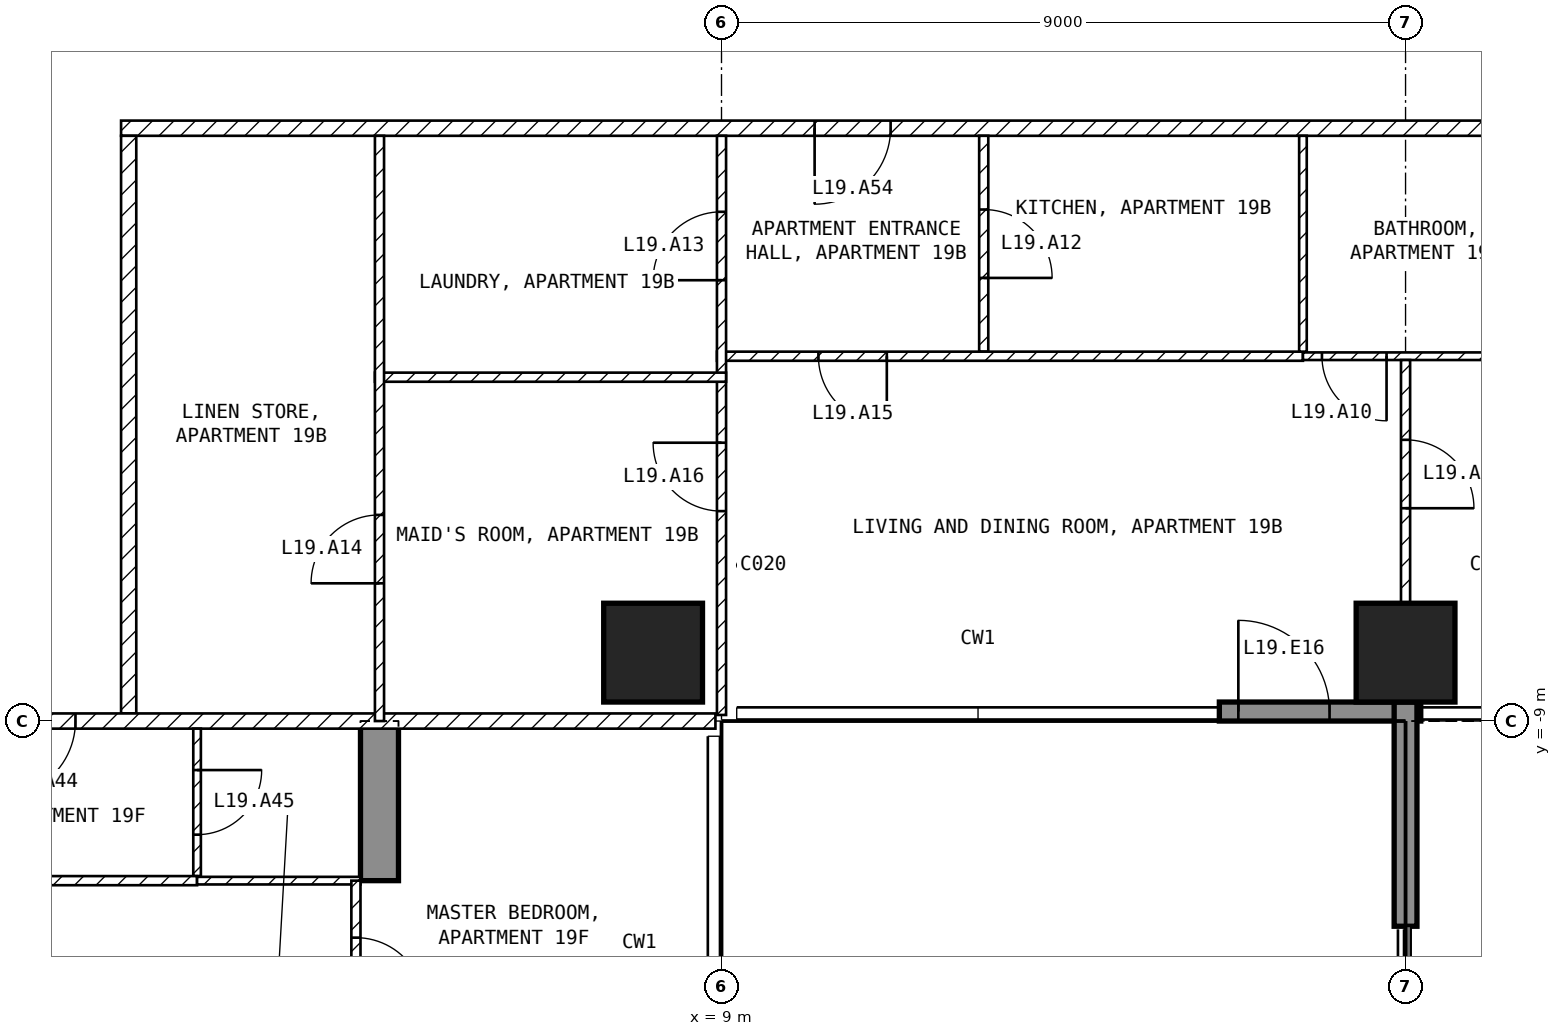
"""IFC4 building model, lengths in metres.
Left out: names, types, materials, properties, quantities, classifications, styles, units other than length and angle.
Written with IfcOpenShell. Run it as: python <this file> out.ifc"""

import sys

from ifc_helpers import new_model, si_unit, direction, frame, frame_2d, origin, origin_2d, place, context, subcontext, project, spatial, polyline, rectangle, outline, extrude, element, fill, save


model = new_model("IFC4")
c1 = context("Model", 3, precision=1e-05, world=origin(), true_north=direction((0.0, 1.0)))
c2 = subcontext(c1, "Body", "Model", "MODEL_VIEW")
j1 = project(units=[si_unit("LENGTHUNIT", "METRE"), si_unit("PLANEANGLEUNIT", "RADIAN")], contexts=[c1])
p1 = place(None, origin())
s1 = spatial("IfcSite", under=j1, at=p1, CompositionType="ELEMENT")
p2 = place(p1, origin())
s2 = spatial("IfcBuilding", under=s1, at=p2, CompositionType="ELEMENT")
p3 = place(p2, frame((0.0, 0.0, 85.5)))
s3 = spatial("IfcBuildingStorey", under=s2, at=p3, CompositionType="ELEMENT", Elevation=85.5)
for number, where, z_axis, x_axis in (
    (1, (8.1, -8.1, -0.25), (0.0, 0.0, 1.0), (1.0, 0.0, 0.0)),
    (2, (18.0, -8.1, -0.25), (0.0, 0.0, 1.0), (1.0, 0.0, 0.0)),
):
    element("IfcColumn", number, at=place(p3, frame(where, z_axis=z_axis, x_axis=x_axis)), inside=s3, PredefinedType="COLUMN", context=c2, shape_type="SweptSolid", body=[
        extrude(rectangle(XDim=1.3, YDim=1.3, at=origin_2d()), origin(), (0.0, 0.0, 1.0), 3.5),
    ])
p4 = place(p3, frame((4.25, -25.45, -0.25), z_axis=(1.0, 0.0, 0.0), x_axis=(0.0, 1.0, 0.0)))
e3 = element("IfcWall", 3, at=p4, inside=s3, PredefinedType="SHEAR", context=c2, shape_type="SweptSolid", body=[
    extrude(outline(polyline([(0.0, 0.0), (4.15, 0.0), (4.15, 2.65), (6.55, 2.65), (6.55, 0.0), (11.95, 0.0), (11.95, 2.65), (14.35, 2.65), (14.35, 0.0), (16.45, 0.0), (16.45, 3.5), (0.0, 3.5), (0.0, 0.0)])), origin(), (0.0, 0.0, 1.0), 0.5),
])
p5 = place(p3, frame((15.55, -8.875, 0.0), z_axis=(0.0, 0.0, 1.0), x_axis=(1.0, 0.0, 0.0)))
e4 = element("IfcWall", 4, at=p5, inside=s3, PredefinedType="SOLIDWALL", context=c2, shape_type="SweptSolid", body=[
    extrude(rectangle(XDim=2.65, YDim=0.25, at=frame_2d((1.325, 0.0))), origin(), (0.0, 0.0, 1.0), 3.25),
])
p6 = place(p5, frame((0.25, 0.0, 0.0)))
e5 = element("IfcOpeningElement", 5, at=p6, cuts=e4, PredefinedType="OPENING", context=c2, shape_type="SweptSolid", body=[
    extrude(rectangle(XDim=1.2, YDim=2.4, at=frame_2d((0.6, 1.2))), frame((0.0, 0.135, 0.0), z_axis=(0.0, -1.0, 0.0), x_axis=(1.0, 0.0, 0.0)), (0.0, 0.0, 1.0), 0.27),
])
p7 = place(p3, frame((18.0, -8.75, 0.0), z_axis=(0.0, 0.0, 1.0), x_axis=(0.0, -1.0, 0.0)))
e6 = element("IfcWall", 6, at=p7, inside=s3, PredefinedType="SOLIDWALL", context=c2, shape_type="SweptSolid", body=[
    extrude(rectangle(XDim=2.95, YDim=0.3, at=frame_2d((1.475, 0.0))), origin(), (0.0, 0.0, 1.0), 3.25),
])
p8 = place(p3, frame((21.6, -1.2, 0.0), z_axis=(0.0, 0.0, 1.0), x_axis=(-1.0, 0.0, 0.0)))
e7 = element("IfcWall", 7, at=p8, inside=s3, PredefinedType="PARTITIONING", context=c2, shape_type="SweptSolid", body=[
    extrude(rectangle(XDim=20.5, YDim=0.2, at=frame_2d((10.25, 0.0))), origin(), (0.0, 0.0, 1.0), 3.25),
])
p9 = place(p8, frame((10.375, 0.0, 0.0)))
e8 = element("IfcOpeningElement", 8, at=p9, cuts=e7, PredefinedType="OPENING", context=c2, shape_type="SweptSolid", body=[
    extrude(rectangle(XDim=1.0, YDim=2.1, at=frame_2d((0.5, 1.05))), frame((0.0, 0.11, 0.0), z_axis=(0.0, -1.0, 0.0), x_axis=(1.0, 0.0, 0.0)), (0.0, 0.0, 1.0), 0.22),
])
p10 = place(p3, frame((1.2, -1.3, 0.0), z_axis=(0.0, 0.0, 1.0), x_axis=(0.0, -1.0, 0.0)))
e9 = element("IfcWall", 9, at=p10, inside=s3, PredefinedType="PARTITIONING", context=c2, shape_type="SweptSolid", body=[
    extrude(rectangle(XDim=7.6, YDim=0.2, at=frame_2d((3.8, 0.0))), origin(), (0.0, 0.0, 1.0), 3.25),
])
p11 = place(p3, frame((8.92, -9.0, 0.0), z_axis=(0.0, 0.0, 1.0), x_axis=(-1.0, 0.0, 0.0)))
e10 = element("IfcWall", 10, at=p11, inside=s3, PredefinedType="PARTITIONING", context=c2, shape_type="SweptSolid", body=[
    extrude(rectangle(XDim=17.84, YDim=0.2, at=frame_2d((8.92, 0.0))), origin(), (0.0, 0.0, 1.0), 3.25),
])
p12 = place(p11, frame((8.42, 0.0, 0.0)))
e11 = element("IfcOpeningElement", 11, at=p12, cuts=e10, PredefinedType="OPENING", context=c2, shape_type="SweptSolid", body=[
    extrude(rectangle(XDim=1.0, YDim=2.1, at=frame_2d((0.5, 1.05))), frame((0.0, 0.11, 0.0), z_axis=(0.0, -1.0, 0.0), x_axis=(1.0, 0.0, 0.0)), (0.0, 0.0, 1.0), 0.22),
])
p13 = place(p3, frame((12.45, -1.3, 0.0), z_axis=(0.0, 0.0, 1.0), x_axis=(0.0, -1.0, 0.0)))
e12 = element("IfcWall", 12, at=p13, inside=s3, PredefinedType="PARTITIONING", context=c2, shape_type="SweptSolid", body=[
    extrude(rectangle(XDim=2.84, YDim=0.12, at=frame_2d((1.42, 0.0))), origin(), (0.0, 0.0, 1.0), 3.25),
])
p14 = place(p13, frame((0.97, 0.0, 0.0)))
e13 = element("IfcOpeningElement", 13, at=p14, cuts=e12, PredefinedType="OPENING", context=c2, shape_type="SweptSolid", body=[
    extrude(rectangle(XDim=0.9, YDim=2.1, at=frame_2d((0.45, 1.05))), frame((0.0, 0.07, 0.0), z_axis=(0.0, -1.0, 0.0), x_axis=(1.0, 0.0, 0.0)), (0.0, 0.0, 1.0), 0.14),
])
p15 = place(p3, frame((16.65, -4.2, 0.0), z_axis=(0.0, 0.0, 1.0), x_axis=(-1.0, 0.0, 0.0)))
e14 = element("IfcWall", 14, at=p15, inside=s3, PredefinedType="PARTITIONING", context=c2, shape_type="SweptSolid", body=[
    extrude(rectangle(XDim=7.71, YDim=0.12, at=frame_2d((3.855, 0.0))), origin(), (0.0, 0.0, 1.0), 3.25),
])
p16 = place(p15, frame((5.475, 0.0, 0.0)))
e15 = element("IfcOpeningElement", 15, at=p16, cuts=e14, PredefinedType="OPENING", context=c2, shape_type="SweptSolid", body=[
    extrude(rectangle(XDim=0.9, YDim=2.1, at=frame_2d((0.45, 1.05))), frame((0.0, 0.07, 0.0), z_axis=(0.0, -1.0, 0.0), x_axis=(1.0, 0.0, 0.0)), (0.0, 0.0, 1.0), 0.14),
])
p17 = place(p3, frame((9.0, -8.92, 0.0), z_axis=(0.0, 0.0, 1.0), x_axis=(0.0, 1.0, 0.0)))
e16 = element("IfcWall", 16, at=p17, inside=s3, PredefinedType="PARTITIONING", context=c2, shape_type="SweptSolid", body=[
    extrude(rectangle(XDim=7.62, YDim=0.12, at=frame_2d((3.81, 0.0))), origin(), (0.0, 0.0, 1.0), 3.25),
])
p18 = place(p17, frame((5.72, 0.0, 0.0)))
e17 = element("IfcOpeningElement", 17, at=p18, cuts=e16, PredefinedType="OPENING", context=c2, shape_type="SweptSolid", body=[
    extrude(rectangle(XDim=0.9, YDim=2.1, at=frame_2d((0.45, 1.05))), frame((0.0, 0.07, 0.0), z_axis=(0.0, -1.0, 0.0), x_axis=(1.0, 0.0, 0.0)), (0.0, 0.0, 1.0), 0.14),
])
p19 = place(p17, frame((2.682, 0.0, 0.0)))
e18 = element("IfcOpeningElement", 18, at=p19, cuts=e16, PredefinedType="OPENING", context=c2, shape_type="SweptSolid", body=[
    extrude(rectangle(XDim=0.9, YDim=2.1, at=frame_2d((0.45, 1.05))), frame((0.0, 0.07, 0.0), z_axis=(0.0, -1.0, 0.0), x_axis=(1.0, 0.0, 0.0)), (0.0, 0.0, 1.0), 0.14),
])
p20 = place(p3, frame((16.65, -1.3, 0.0), z_axis=(0.0, 0.0, 1.0), x_axis=(0.0, -1.0, 0.0)))
e19 = element("IfcWall", 19, at=p20, inside=s3, PredefinedType="PARTITIONING", context=c2, shape_type="SweptSolid", body=[
    extrude(rectangle(XDim=2.84, YDim=0.1, at=frame_2d((1.42, 0.0))), origin(), (0.0, 0.0, 1.0), 3.25),
])
p21 = place(p3, frame((19.8, -4.2, 0.0), z_axis=(0.0, 0.0, 1.0), x_axis=(-1.0, 0.0, 0.0)))
e20 = element("IfcWall", 20, at=p21, inside=s3, PredefinedType="PARTITIONING", context=c2, shape_type="SweptSolid", body=[
    extrude(rectangle(XDim=3.15, YDim=0.1, at=frame_2d((1.575, 0.0))), origin(), (0.0, 0.0, 1.0), 3.25),
])
p22 = place(p21, frame((2.05, 0.0, 0.0)))
e21 = element("IfcOpeningElement", 21, at=p22, cuts=e20, PredefinedType="OPENING", context=c2, shape_type="SweptSolid", body=[
    extrude(rectangle(XDim=0.85, YDim=2.1, at=frame_2d((0.425, 1.05))), frame((0.0, 0.06, 0.0), z_axis=(0.0, -1.0, 0.0), x_axis=(1.0, 0.0, 0.0)), (0.0, 0.0, 1.0), 0.12),
])
p23 = place(p3, frame((18.0, -4.25, 0.0), z_axis=(0.0, 0.0, 1.0), x_axis=(0.0, -1.0, 0.0)))
e22 = element("IfcWall", 22, at=p23, inside=s3, PredefinedType="PARTITIONING", context=c2, shape_type="SweptSolid", body=[
    extrude(rectangle(XDim=3.2, YDim=0.12, at=frame_2d((1.6, 0.0))), origin(), (0.0, 0.0, 1.0), 2.346),
])
p24 = place(p23, frame((1.05, 0.0, 0.0)))
e23 = element("IfcOpeningElement", 23, at=p24, cuts=e22, PredefinedType="OPENING", context=c2, shape_type="SweptSolid", body=[
    extrude(rectangle(XDim=0.9, YDim=2.1, at=frame_2d((0.45, 1.05))), frame((0.0, 0.07, 0.0), z_axis=(0.0, -1.0, 0.0), x_axis=(1.0, 0.0, 0.0)), (0.0, 0.0, 1.0), 0.14),
])
p25 = place(p3, frame((9.06, -4.476, 0.0), z_axis=(0.0, 0.0, 1.0), x_axis=(-1.0, 0.0, 0.0)))
e24 = element("IfcWall", 24, at=p25, inside=s3, PredefinedType="PARTITIONING", context=c2, shape_type="SweptSolid", body=[
    extrude(rectangle(XDim=4.62, YDim=0.12, at=frame_2d((2.31, 0.0))), origin(), (0.0, 0.0, 1.0), 3.25),
])
p26 = place(p3, frame((4.5, -9.0, 0.0), z_axis=(0.0, 0.0, 1.0), x_axis=(0.0, 1.0, 0.0)))
e25 = element("IfcWall", 25, at=p26, inside=s3, PredefinedType="PARTITIONING", context=c2, shape_type="SweptSolid", body=[
    extrude(rectangle(XDim=7.7, YDim=0.12, at=frame_2d((3.85, 0.0))), origin(), (0.0, 0.0, 1.0), 3.25),
])
p27 = place(p26, frame((1.812, 0.0, 0.0)))
e26 = element("IfcOpeningElement", 26, at=p27, cuts=e25, PredefinedType="OPENING", context=c2, shape_type="SweptSolid", body=[
    extrude(rectangle(XDim=0.9, YDim=2.1, at=frame_2d((0.45, 1.05))), frame((0.0, 0.07, 0.0), z_axis=(0.0, -1.0, 0.0), x_axis=(1.0, 0.0, 0.0)), (0.0, 0.0, 1.0), 0.14),
])
p28 = place(p3, frame((2.1, -9.1, 0.0), z_axis=(0.0, 0.0, 1.0), x_axis=(0.0, -1.0, 0.0)))
e27 = element("IfcWall", 27, at=p28, inside=s3, PredefinedType="PARTITIONING", context=c2, shape_type="SweptSolid", body=[
    extrude(rectangle(XDim=1.94, YDim=0.1, at=frame_2d((0.97, 0.0))), origin(), (0.0, 0.0, 1.0), 3.25),
])
p29 = place(p28, frame((0.545, 0.0, 0.0)))
e28 = element("IfcOpeningElement", 28, at=p29, cuts=e27, PredefinedType="OPENING", context=c2, shape_type="SweptSolid", body=[
    extrude(rectangle(XDim=0.85, YDim=2.1, at=frame_2d((0.425, 1.05))), frame((0.0, 0.06, 0.0), z_axis=(0.0, -1.0, 0.0), x_axis=(1.0, 0.0, 0.0)), (0.0, 0.0, 1.0), 0.12),
])
p30 = place(p3, frame((2.1, -11.1, 0.0), z_axis=(0.0, 0.0, 1.0), x_axis=(-1.0, 0.0, 0.0)))
e29 = element("IfcWall", 29, at=p30, inside=s3, PredefinedType="PARTITIONING", context=c2, shape_type="SweptSolid", body=[
    extrude(rectangle(XDim=6.35, YDim=0.12, at=frame_2d((3.175, 0.0))), origin(), (0.0, 0.0, 1.0), 3.25),
])
p31 = place(p30, frame((2.725, 0.0, 0.0)))
e30 = element("IfcOpeningElement", 30, at=p31, cuts=e29, PredefinedType="OPENING", context=c2, shape_type="SweptSolid", body=[
    extrude(rectangle(XDim=0.9, YDim=2.1, at=frame_2d((0.45, 1.05))), frame((0.0, 0.07, 0.0), z_axis=(0.0, -1.0, 0.0), x_axis=(1.0, 0.0, 0.0)), (0.0, 0.0, 1.0), 0.14),
])
p32 = place(p3, frame((4.25, -11.1, 0.0), z_axis=(0.0, 0.0, 1.0), x_axis=(-1.0, 0.0, 0.0)))
e31 = element("IfcWall", 31, at=p32, inside=s3, PredefinedType="PARTITIONING", context=c2, shape_type="SweptSolid", body=[
    extrude(rectangle(XDim=2.15, YDim=0.1, at=frame_2d((1.075, 0.0))), origin(), (0.0, 0.0, 1.0), 3.25),
])
p33 = place(p3, frame((4.19, -11.1, 0.0), z_axis=(0.0, 0.0, 1.0), x_axis=(0.0, -1.0, 0.0)))
e32 = element("IfcWall", 32, at=p33, inside=s3, PredefinedType="PARTITIONING", context=c2, shape_type="SweptSolid", body=[
    extrude(rectangle(XDim=2.4, YDim=0.12, at=frame_2d((1.2, 0.0))), origin(), (0.0, 0.0, 1.0), 2.4),
])
p34 = place(p33, frame((0.75, 0.0, 0.0)))
e33 = element("IfcOpeningElement", 33, at=p34, cuts=e32, PredefinedType="OPENING", context=c2, shape_type="SweptSolid", body=[
    extrude(rectangle(XDim=0.9, YDim=2.1, at=frame_2d((0.45, 1.05))), frame((0.0, 0.07, 0.0), z_axis=(0.0, -1.0, 0.0), x_axis=(1.0, 0.0, 0.0)), (0.0, 0.0, 1.0), 0.14),
])
p35 = place(p6, origin())
e34 = element("IfcDoor", 34, at=p35, inside=s3, OperationType="SINGLE_SWING_LEFT", PredefinedType="DOOR", context=c2, shape_type="SweptSolid", body=[
    extrude(rectangle(XDim=1.2, YDim=2.4, at=frame_2d((0.6, 1.2))), frame((0.0, 0.025, 0.0), z_axis=(0.0, -1.0, 0.0), x_axis=(1.0, 0.0, 0.0)), (0.0, 0.0, 1.0), 0.05),
])
fill(e5, e34)
p36 = place(p22, origin())
e35 = element("IfcDoor", 35, at=p36, inside=s3, OperationType="SINGLE_SWING_LEFT", PredefinedType="DOOR", context=c2, shape_type="SweptSolid", body=[
    extrude(rectangle(XDim=0.85, YDim=2.1, at=frame_2d((0.425, 1.05))), frame((0.0, 0.025, 0.0), z_axis=(0.0, -1.0, 0.0), x_axis=(1.0, 0.0, 0.0)), (0.0, 0.0, 1.0), 0.05),
])
fill(e21, e35)
p37 = place(p24, origin())
e36 = element("IfcDoor", 36, at=p37, inside=s3, OperationType="SINGLE_SWING_RIGHT", PredefinedType="DOOR", context=c2, shape_type="SweptSolid", body=[
    extrude(rectangle(XDim=0.9, YDim=2.1, at=frame_2d((0.45, 1.05))), frame((0.0, 0.025, 0.0), z_axis=(0.0, -1.0, 0.0), x_axis=(1.0, 0.0, 0.0)), (0.0, 0.0, 1.0), 0.05),
])
fill(e23, e36)
p38 = place(p14, origin())
e37 = element("IfcDoor", 37, at=p38, inside=s3, OperationType="SINGLE_SWING_RIGHT", PredefinedType="DOOR", context=c2, shape_type="SweptSolid", body=[
    extrude(rectangle(XDim=0.9, YDim=2.1, at=frame_2d((0.45, 1.05))), frame((0.0, 0.025, 0.0), z_axis=(0.0, -1.0, 0.0), x_axis=(1.0, 0.0, 0.0)), (0.0, 0.0, 1.0), 0.05),
])
fill(e13, e37)
p39 = place(p18, origin())
e38 = element("IfcDoor", 38, at=p39, inside=s3, OperationType="SINGLE_SWING_LEFT", PredefinedType="DOOR", context=c2, shape_type="SweptSolid", body=[
    extrude(rectangle(XDim=0.9, YDim=2.1, at=frame_2d((0.45, 1.05))), frame((0.0, 0.025, 0.0), z_axis=(0.0, -1.0, 0.0), x_axis=(1.0, 0.0, 0.0)), (0.0, 0.0, 1.0), 0.05),
])
fill(e17, e38)
p40 = place(p27, origin())
e39 = element("IfcDoor", 39, at=p40, inside=s3, OperationType="SINGLE_SWING_LEFT", PredefinedType="DOOR", context=c2, shape_type="SweptSolid", body=[
    extrude(rectangle(XDim=0.9, YDim=2.1, at=frame_2d((0.45, 1.05))), frame((0.0, 0.025, 0.0), z_axis=(0.0, -1.0, 0.0), x_axis=(1.0, 0.0, 0.0)), (0.0, 0.0, 1.0), 0.05),
])
fill(e26, e39)
p41 = place(p16, origin())
e40 = element("IfcDoor", 40, at=p41, inside=s3, OperationType="SINGLE_SWING_LEFT", PredefinedType="DOOR", context=c2, shape_type="SweptSolid", body=[
    extrude(rectangle(XDim=0.9, YDim=2.1, at=frame_2d((0.45, 1.05))), frame((0.0, 0.025, 0.0), z_axis=(0.0, -1.0, 0.0), x_axis=(1.0, 0.0, 0.0)), (0.0, 0.0, 1.0), 0.05),
])
fill(e15, e40)
p42 = place(p19, origin())
e41 = element("IfcDoor", 41, at=p42, inside=s3, OperationType="SINGLE_SWING_RIGHT", PredefinedType="DOOR", context=c2, shape_type="SweptSolid", body=[
    extrude(rectangle(XDim=0.9, YDim=2.1, at=frame_2d((0.45, 1.05))), frame((0.0, 0.025, 0.0), z_axis=(0.0, -1.0, 0.0), x_axis=(1.0, 0.0, 0.0)), (0.0, 0.0, 1.0), 0.05),
])
fill(e18, e41)
p43 = place(p12, origin())
e42 = element("IfcDoor", 42, at=p43, inside=s3, OperationType="SINGLE_SWING_RIGHT", PredefinedType="DOOR", context=c2, shape_type="SweptSolid", body=[
    extrude(rectangle(XDim=1.0, YDim=2.1, at=frame_2d((0.5, 1.05))), frame((0.0, 0.025, 0.0), z_axis=(0.0, -1.0, 0.0), x_axis=(1.0, 0.0, 0.0)), (0.0, 0.0, 1.0), 0.05),
])
fill(e11, e42)
p44 = place(p29, origin())
e43 = element("IfcDoor", 43, at=p44, inside=s3, OperationType="SINGLE_SWING_LEFT", PredefinedType="DOOR", context=c2, shape_type="SweptSolid", body=[
    extrude(rectangle(XDim=0.85, YDim=2.1, at=frame_2d((0.425, 1.05))), frame((0.0, 0.025, 0.0), z_axis=(0.0, -1.0, 0.0), x_axis=(1.0, 0.0, 0.0)), (0.0, 0.0, 1.0), 0.05),
])
fill(e28, e43)
p45 = place(p9, origin())
e44 = element("IfcDoor", 44, at=p45, inside=s3, OperationType="SINGLE_SWING_RIGHT", PredefinedType="DOOR", context=c2, shape_type="SweptSolid", body=[
    extrude(rectangle(XDim=1.0, YDim=2.1, at=frame_2d((0.5, 1.05))), frame((0.0, 0.025, 0.0), z_axis=(0.0, -1.0, 0.0), x_axis=(1.0, 0.0, 0.0)), (0.0, 0.0, 1.0), 0.05),
])
fill(e8, e44)
p46 = place(p34, origin())
e45 = element("IfcDoor", 45, at=p46, inside=s3, OperationType="SINGLE_SWING_RIGHT", PredefinedType="DOOR", context=c2, shape_type="SweptSolid", body=[
    extrude(rectangle(XDim=0.9, YDim=2.1, at=frame_2d((0.45, 1.05))), frame((0.0, 0.025, 0.0), z_axis=(0.0, -1.0, 0.0), x_axis=(1.0, 0.0, 0.0)), (0.0, 0.0, 1.0), 0.05),
])
fill(e33, e45)
save(model, sys.argv[1])
